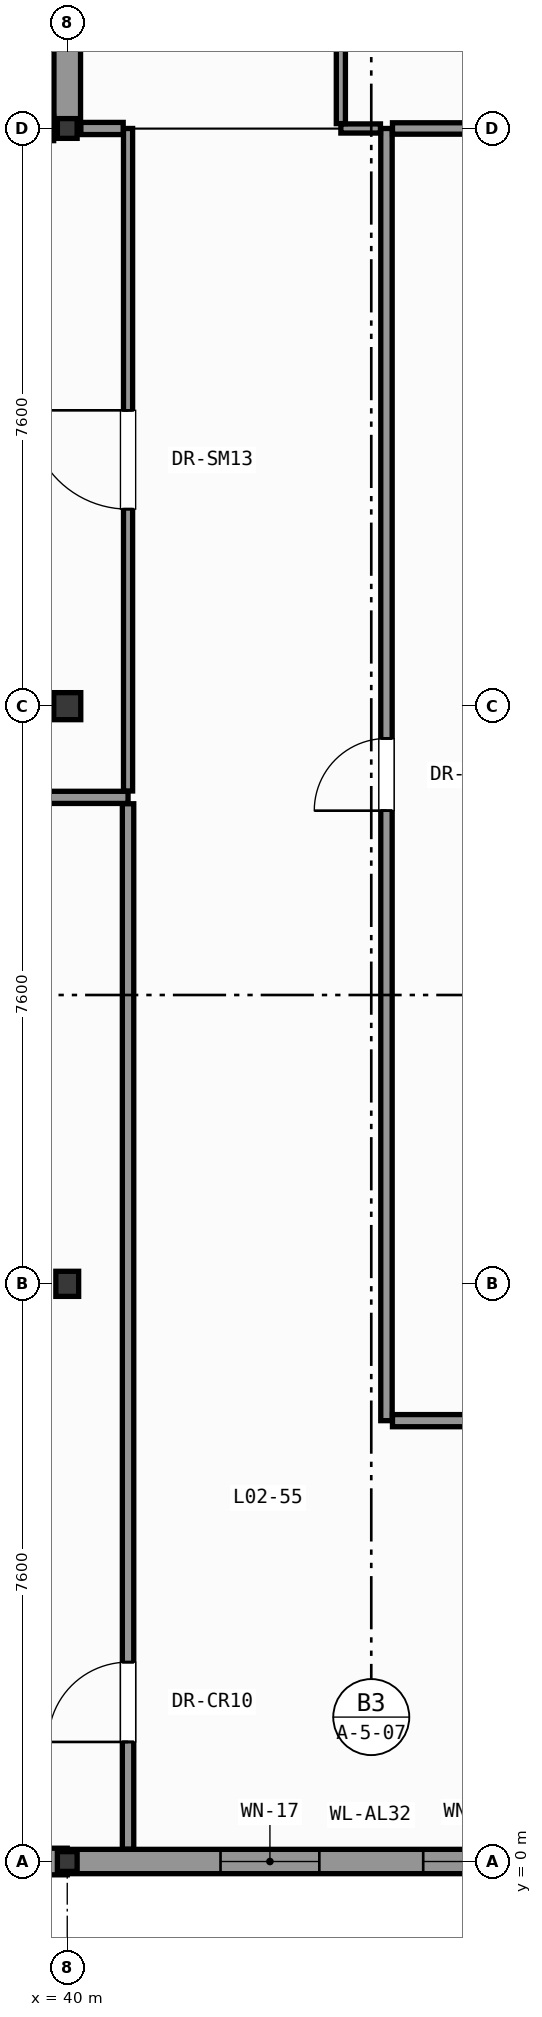
"""IFC4 building model, lengths in metres.
Left out: names, types, materials, properties, quantities, classifications, styles, units other than length and angle.
Written with IfcOpenShell. Run it as: python <this file> out.ifc"""

import sys

from ifc_helpers import new_model, si_unit, direction, frame, frame_2d, origin, origin_2d, place, context, subcontext, project, spatial, rectangle, hollow_rectangle, hollow_circle, i_section, extrude, element, fill, save


model = new_model("IFC4")
c1 = context("Model", 3, precision=1e-05, world=origin(), true_north=direction((0.0, 1.0)))
c2 = subcontext(c1, "Body", "Model", "MODEL_VIEW")
j1 = project(units=[si_unit("LENGTHUNIT", "METRE"), si_unit("PLANEANGLEUNIT", "RADIAN")], contexts=[c1])
p1 = place(None, origin())
s1 = spatial("IfcSite", under=j1, at=p1, CompositionType="ELEMENT")
p2 = place(p1, origin())
s2 = spatial("IfcBuilding", under=s1, at=p2, CompositionType="ELEMENT")
p3 = place(p2, frame((0.0, 0.0, 7.8)))
s3 = spatial("IfcBuildingStorey", under=s2, at=p3, CompositionType="ELEMENT", Elevation=7.8)
p4 = place(p3, frame((40.0, 0.0, 0.0), z_axis=(0.0, 0.0, 1.0), x_axis=(1.0, 0.0, 0.0)))
e1 = element("IfcColumn", 1, at=p4, inside=s3, PredefinedType="COLUMN", context=c2, shape_type="SweptSolid", body=[
    extrude(hollow_rectangle(XDim=0.26, YDim=0.26, WallThickness=0.012, InnerFilletRadius=0.012, OuterFilletRadius=0.025, at=origin_2d()), origin(), (0.0, 0.0, 1.0), 5.4),
])
p5 = place(p3, frame((40.0, 7.6, 0.0), z_axis=(0.0, 0.0, 1.0), x_axis=(1.0, 0.0, 0.0)))
e2 = element("IfcColumn", 2, at=p5, inside=s3, PredefinedType="COLUMN", context=c2, shape_type="SweptSolid", body=[
    extrude(i_section(OverallWidth=0.3, OverallDepth=0.33, WebThickness=0.01, FlangeThickness=0.017, FilletRadius=0.027, at=origin_2d()), origin(), (0.0, 0.0, 1.0), 5.4),
])
p6 = place(p3, frame((40.0, 15.2, 0.0), z_axis=(0.0, 0.0, 1.0), x_axis=(1.0, 0.0, 0.0)))
e3 = element("IfcColumn", 3, at=p6, inside=s3, PredefinedType="COLUMN", context=c2, shape_type="SweptSolid", body=[
    extrude(hollow_circle(Radius=0.178, WallThickness=0.016, at=origin_2d()), origin(), (0.0, 0.0, 1.0), 5.4),
])
p7 = place(p3, frame((40.0, 22.8, 0.0), z_axis=(0.0, 0.0, 1.0), x_axis=(1.0, 0.0, 0.0)))
e4 = element("IfcColumn", 4, at=p7, inside=s3, PredefinedType="COLUMN", context=c2, shape_type="SweptSolid", body=[
    extrude(hollow_rectangle(XDim=0.26, YDim=0.26, WallThickness=0.012, InnerFilletRadius=0.012, OuterFilletRadius=0.025, at=origin_2d()), origin(), (0.0, 0.0, 1.0), 5.4),
])
p8 = place(p3, frame((40.0, 0.0, 0.0), z_axis=(0.0, 0.0, 1.0), x_axis=(-1.0, 0.0, 0.0)))
e5 = element("IfcWall", 5, at=p8, inside=s3, PredefinedType="SOLIDWALL", context=c2, shape_type="SweptSolid", body=[
    extrude(rectangle(XDim=8.0, YDim=0.35, at=frame_2d((4.0, 0.0))), origin(), (0.0, 0.0, 1.0), 4.745),
])
p9 = place(p3, frame((48.0, 0.0, 0.0), z_axis=(0.0, 0.0, 1.0), x_axis=(-1.0, 0.0, 0.0)))
e6 = element("IfcWall", 6, at=p9, inside=s3, PredefinedType="SOLIDWALL", context=c2, shape_type="SweptSolid", body=[
    extrude(rectangle(XDim=8.0, YDim=0.32, at=frame_2d((4.0, 0.0))), origin(), (0.0, 0.0, 1.0), 4.745),
])
p10 = place(p9, frame((2.017, 0.0, 0.95)))
e7 = element("IfcOpeningElement", 7, at=p10, cuts=e6, PredefinedType="OPENING", context=c2, shape_type="SweptSolid", body=[
    extrude(rectangle(XDim=1.3, YDim=2.3, at=frame_2d((0.65, 1.15))), frame((0.0, 0.17, 0.0), z_axis=(0.0, -1.0, 0.0), x_axis=(1.0, 0.0, 0.0)), (0.0, 0.0, 1.0), 0.34),
])
p11 = place(p9, frame((4.683, 0.0, 0.95)))
e8 = element("IfcOpeningElement", 8, at=p11, cuts=e6, PredefinedType="OPENING", context=c2, shape_type="SweptSolid", body=[
    extrude(rectangle(XDim=1.3, YDim=2.3, at=frame_2d((0.65, 1.15))), frame((0.0, 0.17, 0.0), z_axis=(0.0, -1.0, 0.0), x_axis=(1.0, 0.0, 0.0)), (0.0, 0.0, 1.0), 0.34),
])
p12 = place(p3, frame((40.0, 22.8, 0.0), z_axis=(0.0, 0.0, 1.0), x_axis=(0.0, 1.0, 0.0)))
e9 = element("IfcWall", 9, at=p12, inside=s3, PredefinedType="SOLIDWALL", context=c2, shape_type="SweptSolid", body=[
    extrude(rectangle(XDim=7.6, YDim=0.35, at=frame_2d((3.8, 0.0))), origin(), (0.0, 0.0, 1.0), 5.15),
])
p13 = place(p12, frame((2.375, 0.0, 0.95)))
e10 = element("IfcOpeningElement", 10, at=p13, cuts=e9, PredefinedType="OPENING", context=c2, shape_type="SweptSolid", body=[
    extrude(rectangle(XDim=2.85, YDim=3.8, at=frame_2d((1.425, 1.9))), frame((0.0, 0.185, 0.0), z_axis=(0.0, -1.0, 0.0), x_axis=(1.0, 0.0, 0.0)), (0.0, 0.0, 1.0), 0.37),
])
p14 = place(p3, frame((32.0, 22.8, 0.0), z_axis=(0.0, 0.0, 1.0), x_axis=(1.0, 0.0, 0.0)))
e11 = element("IfcWall", 11, at=p14, inside=s3, PredefinedType="SOLIDWALL", context=c2, shape_type="SweptSolid", body=[
    extrude(rectangle(XDim=7.821, YDim=0.32, at=frame_2d((3.911, 0.0))), origin(), (0.0, 0.0, 1.0), 4.815),
])
p15 = place(p3, frame((24.179, 14.0, 0.0), z_axis=(0.0, 0.0, 1.0), x_axis=(1.0, 0.0, 0.0)))
e12 = element("IfcWall", 12, at=p15, inside=s3, PredefinedType="PARTITIONING", context=c2, shape_type="SweptSolid", body=[
    extrude(rectangle(XDim=16.621, YDim=0.16, at=frame_2d((8.311, 0.0))), origin(), (0.0, 0.0, 1.0), 5.15),
])
p16 = place(p15, frame((1.42, 0.0, 0.0)))
e13 = element("IfcOpeningElement", 13, at=p16, cuts=e12, PredefinedType="OPENING", context=c2, shape_type="SweptSolid", body=[
    extrude(rectangle(XDim=1.3, YDim=2.25, at=frame_2d((0.65, 1.125))), frame((0.0, 0.09, 0.0), z_axis=(0.0, -1.0, 0.0), x_axis=(1.0, 0.0, 0.0)), (0.0, 0.0, 1.0), 0.18),
])
p17 = place(p3, frame((40.8, 0.164, 0.0), z_axis=(0.0, 0.0, 1.0), x_axis=(0.0, 1.0, 0.0)))
e14 = element("IfcWall", 14, at=p17, inside=s3, PredefinedType="PARTITIONING", context=c2, shape_type="SweptSolid", body=[
    extrude(rectangle(XDim=13.752, YDim=0.15, at=frame_2d((6.876, 0.0))), origin(), (0.0, 0.0, 1.0), 5.15),
])
p18 = place(p17, frame((1.409, 0.0, 0.0)))
e15 = element("IfcOpeningElement", 15, at=p18, cuts=e14, PredefinedType="OPENING", context=c2, shape_type="SweptSolid", body=[
    extrude(rectangle(XDim=1.05, YDim=2.2, at=frame_2d((0.525, 1.1))), frame((0.0, 0.085, 0.0), z_axis=(0.0, -1.0, 0.0), x_axis=(1.0, 0.0, 0.0)), (0.0, 0.0, 1.0), 0.17),
])
p19 = place(p3, frame((40.8, 14.084, 0.0), z_axis=(0.0, 0.0, 1.0), x_axis=(0.0, 1.0, 0.0)))
e16 = element("IfcWall", 16, at=p19, inside=s3, PredefinedType="PARTITIONING", context=c2, shape_type="SweptSolid", body=[
    extrude(rectangle(XDim=8.716, YDim=0.12, at=frame_2d((4.358, 0.0))), origin(), (0.0, 0.0, 1.0), 5.15),
])
p20 = place(p19, frame((3.708, 0.0, 0.0)))
e17 = element("IfcOpeningElement", 17, at=p20, cuts=e16, PredefinedType="OPENING", context=c2, shape_type="SweptSolid", body=[
    extrude(rectangle(XDim=1.3, YDim=2.25, at=frame_2d((0.65, 1.125))), frame((0.0, 0.07, 0.0), z_axis=(0.0, -1.0, 0.0), x_axis=(1.0, 0.0, 0.0)), (0.0, 0.0, 1.0), 0.14),
])
p21 = place(p3, frame((40.179, 22.8, 0.0), z_axis=(0.0, 0.0, 1.0), x_axis=(1.0, 0.0, 0.0)))
e18 = element("IfcWall", 18, at=p21, inside=s3, PredefinedType="PARTITIONING", context=c2, shape_type="SweptSolid", body=[
    extrude(rectangle(XDim=0.557, YDim=0.16, at=frame_2d((0.279, 0.0))), origin(), (0.0, 0.0, 1.0), 4.785),
])
p22 = place(p3, frame((44.2, 5.8, 0.0), z_axis=(0.0, 0.0, 1.0), x_axis=(0.0, 1.0, 0.0)))
e19 = element("IfcWall", 19, at=p22, inside=s3, PredefinedType="PARTITIONING", context=c2, shape_type="SweptSolid", body=[
    extrude(rectangle(XDim=17.0, YDim=0.15, at=frame_2d((8.5, 0.0))), origin(), (0.0, 0.0, 1.0), 5.15),
])
p23 = place(p22, frame((8.025, 0.0, 0.0)))
e20 = element("IfcOpeningElement", 20, at=p23, cuts=e19, PredefinedType="OPENING", context=c2, shape_type="SweptSolid", body=[
    extrude(rectangle(XDim=0.95, YDim=2.1, at=frame_2d((0.475, 1.05))), frame((0.0, 0.085, 0.0), z_axis=(0.0, -1.0, 0.0), x_axis=(1.0, 0.0, 0.0)), (0.0, 0.0, 1.0), 0.17),
])
p24 = place(p3, frame((43.6, 22.8, 0.0), z_axis=(0.0, 0.0, 1.0), x_axis=(1.0, 0.0, 0.0)))
e21 = element("IfcWall", 21, at=p24, inside=s3, PredefinedType="PARTITIONING", context=c2, shape_type="SweptSolid", body=[
    extrude(rectangle(XDim=0.521, YDim=0.12, at=frame_2d((0.26, 0.0))), origin(), (0.0, 0.0, 1.0), 4.785),
])
p25 = place(p3, frame((44.279, 5.8, 0.0), z_axis=(0.0, 0.0, 1.0), x_axis=(1.0, 0.0, 0.0)))
e22 = element("IfcWall", 22, at=p25, inside=s3, PredefinedType="PARTITIONING", context=c2, shape_type="SweptSolid", body=[
    extrude(rectangle(XDim=4.321, YDim=0.16, at=frame_2d((2.161, 0.0))), origin(), (0.0, 0.0, 1.0), 5.15),
])
p26 = place(p25, frame((1.635, 0.0, 0.0)))
e23 = element("IfcOpeningElement", 23, at=p26, cuts=e22, PredefinedType="OPENING", context=c2, shape_type="SweptSolid", body=[
    extrude(rectangle(XDim=1.05, YDim=2.2, at=frame_2d((0.525, 1.1))), frame((0.0, 0.09, 0.0), z_axis=(0.0, -1.0, 0.0), x_axis=(1.0, 0.0, 0.0)), (0.0, 0.0, 1.0), 0.18),
])
p27 = place(p3, frame((44.279, 22.8, 0.0), z_axis=(0.0, 0.0, 1.0), x_axis=(1.0, 0.0, 0.0)))
e24 = element("IfcWall", 24, at=p27, inside=s3, PredefinedType="PARTITIONING", context=c2, shape_type="SweptSolid", body=[
    extrude(rectangle(XDim=3.721, YDim=0.15, at=frame_2d((1.86, 0.0))), origin(), (0.0, 0.0, 1.0), 4.785),
])
p28 = place(p3, frame((43.6, 22.864, 0.0), z_axis=(0.0, 0.0, 1.0), x_axis=(0.0, 1.0, 0.0)))
e25 = element("IfcWall", 25, at=p28, inside=s3, PredefinedType="PARTITIONING", context=c2, shape_type="SweptSolid", body=[
    extrude(rectangle(XDim=29.652, YDim=0.12, at=frame_2d((14.826, 0.0))), origin(), (0.0, 0.0, 1.0), 5.15),
])
p29 = place(p28, frame((13.726, 0.0, 0.0)))
e26 = element("IfcOpeningElement", 26, at=p29, cuts=e25, PredefinedType="OPENING", context=c2, shape_type="SweptSolid", body=[
    extrude(rectangle(XDim=2.2, YDim=2.6, at=frame_2d((1.1, 1.3))), frame((0.0, 0.07, 0.0), z_axis=(0.0, -1.0, 0.0), x_axis=(1.0, 0.0, 0.0)), (0.0, 0.0, 1.0), 0.14),
])
p30 = place(p10, origin())
e27 = element("IfcWindow", 27, at=p30, inside=s3, PartitioningType="SINGLE_PANEL", PredefinedType="WINDOW", context=c2, shape_type="SweptSolid", body=[
    extrude(rectangle(XDim=1.3, YDim=2.3, at=frame_2d((0.65, 1.15))), frame((0.0, 0.03, 0.0), z_axis=(0.0, -1.0, 0.0), x_axis=(1.0, 0.0, 0.0)), (0.0, 0.0, 1.0), 0.06),
])
fill(e7, e27)
p31 = place(p11, origin())
e28 = element("IfcWindow", 28, at=p31, inside=s3, PartitioningType="SINGLE_PANEL", PredefinedType="WINDOW", context=c2, shape_type="SweptSolid", body=[
    extrude(rectangle(XDim=1.3, YDim=2.3, at=frame_2d((0.65, 1.15))), frame((0.0, 0.03, 0.0), z_axis=(0.0, -1.0, 0.0), x_axis=(1.0, 0.0, 0.0)), (0.0, 0.0, 1.0), 0.06),
])
fill(e8, e28)
p32 = place(p18, origin())
e29 = element("IfcDoor", 29, at=p32, inside=s3, OperationType="SINGLE_SWING_LEFT", PredefinedType="DOOR", context=c2, shape_type="SweptSolid", body=[
    extrude(rectangle(XDim=1.05, YDim=2.2, at=frame_2d((0.525, 1.1))), frame((0.0, 0.025, 0.0), z_axis=(0.0, -1.0, 0.0), x_axis=(1.0, 0.0, 0.0)), (0.0, 0.0, 1.0), 0.05),
])
fill(e15, e29)
p33 = place(p20, origin())
e30 = element("IfcDoor", 30, at=p33, inside=s3, OperationType="SINGLE_SWING_RIGHT", PredefinedType="DOOR", context=c2, shape_type="SweptSolid", body=[
    extrude(rectangle(XDim=1.3, YDim=2.25, at=frame_2d((0.65, 1.125))), frame((0.0, 0.025, 0.0), z_axis=(0.0, -1.0, 0.0), x_axis=(1.0, 0.0, 0.0)), (0.0, 0.0, 1.0), 0.05),
])
fill(e17, e30)
p34 = place(p23, origin())
e31 = element("IfcDoor", 31, at=p34, inside=s3, OperationType="SINGLE_SWING_LEFT", PredefinedType="DOOR", context=c2, shape_type="SweptSolid", body=[
    extrude(rectangle(XDim=0.95, YDim=2.1, at=frame_2d((0.475, 1.05))), frame((0.0, 0.025, 0.0), z_axis=(0.0, -1.0, 0.0), x_axis=(1.0, 0.0, 0.0)), (0.0, 0.0, 1.0), 0.05),
])
fill(e20, e31)
save(model, sys.argv[1])
